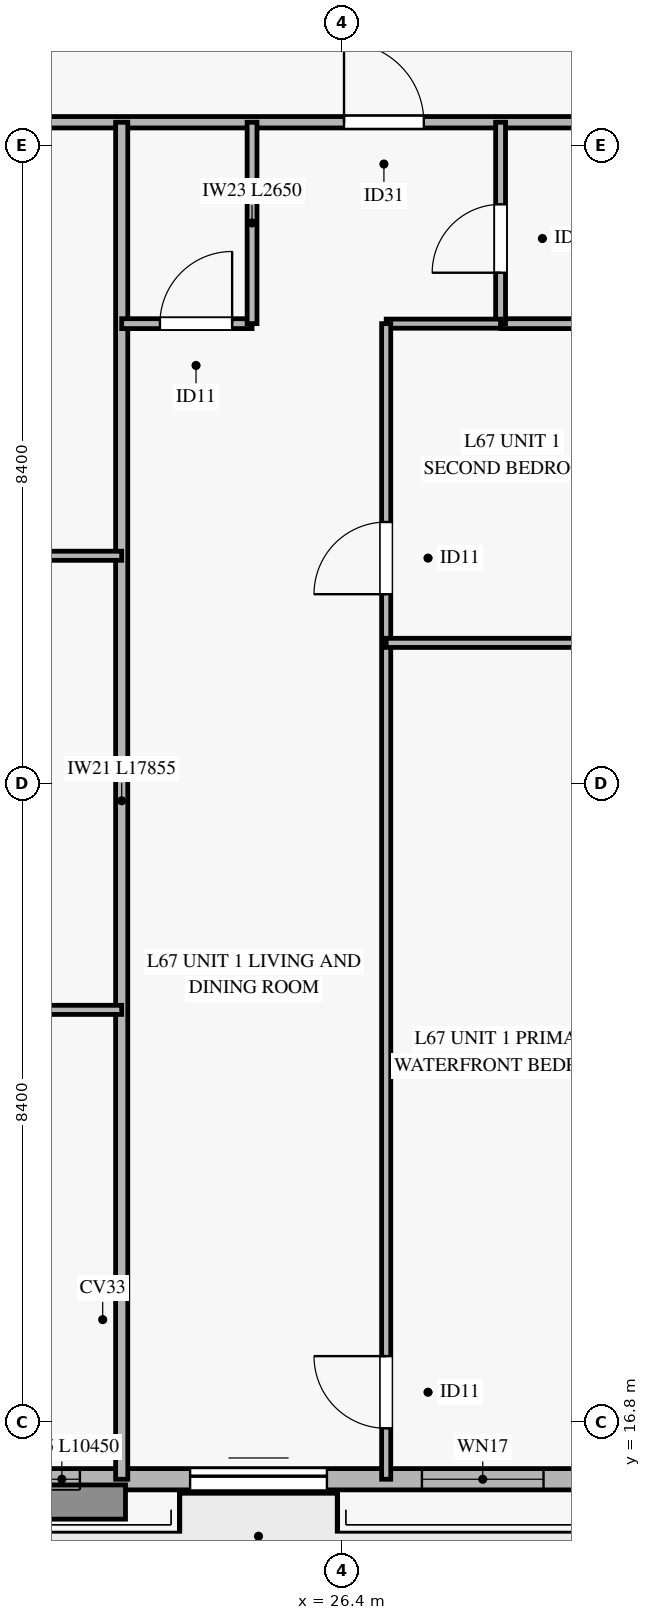
"""IFC4 building model, lengths in metres.
Left out: names, types, materials, properties, quantities, classifications, styles, units other than length and angle.
Written with IfcOpenShell. Run it as: python <this file> out.ifc"""

import sys

from ifc_helpers import new_model, si_unit, direction, frame, frame_2d, origin, place, context, subcontext, project, spatial, rectangle, extrude, source, transform, mapped, element, fill, save


model = new_model("IFC4")
c1 = context("Model", 3, precision=1e-05, world=origin(), true_north=direction((0.0, 1.0)))
c2 = subcontext(c1, "Body", "Model", "MODEL_VIEW")
j1 = project(units=[si_unit("LENGTHUNIT", "METRE"), si_unit("PLANEANGLEUNIT", "RADIAN")], contexts=[c1])
p1 = place(None, origin())
s1 = spatial("IfcSite", under=j1, at=p1, CompositionType="ELEMENT")
p2 = place(p1, origin())
s2 = spatial("IfcBuilding", under=s1, at=p2, CompositionType="ELEMENT")
p3 = place(p2, frame((0.0, 0.0, 262.1)))
s3 = spatial("IfcBuildingStorey", under=s2, at=p3, CompositionType="ELEMENT", Elevation=262.1)
p4 = place(p3, frame((20.1, 16.045, 0.0), z_axis=(0.0, 0.0, 1.0), x_axis=(1.0, 0.0, 0.0)))
e1 = element("IfcWall", 1, at=p4, inside=s3, PredefinedType="SOLIDWALL", context=c2, shape_type="SweptSolid", body=[
    extrude(rectangle(XDim=10.45, YDim=0.28, at=frame_2d((5.225, 0.0))), origin(), (0.0, 0.0, 1.0), 2.815),
])
p5 = place(p4, frame((4.3, 0.0, 0.0)))
e2 = element("IfcOpeningElement", 2, at=p5, cuts=e1, PredefinedType="OPENING", context=c2, shape_type="SweptSolid", body=[
    extrude(rectangle(XDim=1.8, YDim=2.25, at=frame_2d((0.9, 1.125))), frame((0.0, 0.15, 0.0), z_axis=(0.0, -1.0, 0.0), x_axis=(1.0, 0.0, 0.0)), (0.0, 0.0, 1.0), 0.3),
])
p6 = place(p4, frame((0.65, 0.0, 0.45)))
e3 = element("IfcOpeningElement", 3, at=p6, cuts=e1, PredefinedType="OPENING", context=c2, shape_type="SweptSolid", body=[
    extrude(rectangle(XDim=2.2, YDim=2.1, at=frame_2d((1.1, 1.05))), frame((0.0, 0.15, 0.0), z_axis=(0.0, -1.0, 0.0), x_axis=(1.0, 0.0, 0.0)), (0.0, 0.0, 1.0), 0.3),
])
p7 = place(p4, frame((7.35, 0.0, 0.45)))
e4 = element("IfcOpeningElement", 4, at=p7, cuts=e1, PredefinedType="OPENING", context=c2, shape_type="SweptSolid", body=[
    extrude(rectangle(XDim=1.6, YDim=2.0, at=frame_2d((0.8, 1.0))), frame((0.0, 0.15, 0.0), z_axis=(0.0, -1.0, 0.0), x_axis=(1.0, 0.0, 0.0)), (0.0, 0.0, 1.0), 0.3),
])
p8 = place(p3, frame((8.779, 33.9, 0.0), z_axis=(0.0, 0.0, 1.0), x_axis=(1.0, 0.0, 0.0)))
e5 = element("IfcWall", 5, at=p8, inside=s3, PredefinedType="PARTITIONING", context=c2, shape_type="SweptSolid", body=[
    extrude(rectangle(XDim=52.843, YDim=0.15, at=frame_2d((26.421, 0.0))), origin(), (0.0, 0.0, 1.0), 2.47),
])
p9 = place(p8, frame((5.887, 0.0, 0.0)))
e6 = element("IfcOpeningElement", 6, at=p9, cuts=e5, PredefinedType="OPENING", context=c2, shape_type="SweptSolid", body=[
    extrude(rectangle(XDim=1.05, YDim=2.15, at=frame_2d((0.525, 1.075))), frame((0.0, 0.085, 0.0), z_axis=(0.0, -1.0, 0.0), x_axis=(1.0, 0.0, 0.0)), (0.0, 0.0, 1.0), 0.17),
])
p10 = place(p8, frame((17.646, 0.0, 0.0)))
e7 = element("IfcOpeningElement", 7, at=p10, cuts=e5, PredefinedType="OPENING", context=c2, shape_type="SweptSolid", body=[
    extrude(rectangle(XDim=1.05, YDim=2.15, at=frame_2d((0.525, 1.075))), frame((0.0, 0.085, 0.0), z_axis=(0.0, -1.0, 0.0), x_axis=(1.0, 0.0, 0.0)), (0.0, 0.0, 1.0), 0.17),
])
p11 = place(p8, frame((24.174, 0.0, 0.0)))
e8 = element("IfcOpeningElement", 8, at=p11, cuts=e5, PredefinedType="OPENING", context=c2, shape_type="SweptSolid", body=[
    extrude(rectangle(XDim=1.05, YDim=2.15, at=frame_2d((0.525, 1.075))), frame((0.0, 0.085, 0.0), z_axis=(0.0, -1.0, 0.0), x_axis=(1.0, 0.0, 0.0)), (0.0, 0.0, 1.0), 0.17),
])
p12 = place(p8, frame((31.096, 0.0, 0.0)))
e9 = element("IfcOpeningElement", 9, at=p12, cuts=e5, PredefinedType="OPENING", context=c2, shape_type="SweptSolid", body=[
    extrude(rectangle(XDim=1.05, YDim=2.15, at=frame_2d((0.525, 1.075))), frame((0.0, 0.085, 0.0), z_axis=(0.0, -1.0, 0.0), x_axis=(1.0, 0.0, 0.0)), (0.0, 0.0, 1.0), 0.17),
])
p13 = place(p8, frame((37.241, 0.0, 0.0)))
e10 = element("IfcOpeningElement", 10, at=p13, cuts=e5, PredefinedType="OPENING", context=c2, shape_type="SweptSolid", body=[
    extrude(rectangle(XDim=1.05, YDim=2.15, at=frame_2d((0.525, 1.075))), frame((0.0, 0.085, 0.0), z_axis=(0.0, -1.0, 0.0), x_axis=(1.0, 0.0, 0.0)), (0.0, 0.0, 1.0), 0.17),
])
p14 = place(p8, frame((45.359, 0.0, 0.0)))
e11 = element("IfcOpeningElement", 11, at=p14, cuts=e5, PredefinedType="OPENING", context=c2, shape_type="SweptSolid", body=[
    extrude(rectangle(XDim=1.05, YDim=2.15, at=frame_2d((0.525, 1.075))), frame((0.0, 0.085, 0.0), z_axis=(0.0, -1.0, 0.0), x_axis=(1.0, 0.0, 0.0)), (0.0, 0.0, 1.0), 0.17),
])
p15 = place(p3, frame((23.5, 16.045, 0.0), z_axis=(0.0, 0.0, 1.0), x_axis=(0.0, 1.0, 0.0)))
e12 = element("IfcWall", 12, at=p15, inside=s3, PredefinedType="PARTITIONING", context=c2, shape_type="SweptSolid", body=[
    extrude(rectangle(XDim=17.855, YDim=0.16, at=frame_2d((8.927, 0.0))), origin(), (0.0, 0.0, 1.0), 2.77),
])
p16 = place(p3, frame((8.779, 22.221, 0.0), z_axis=(0.0, 0.0, 1.0), x_axis=(1.0, 0.0, 0.0)))
e13 = element("IfcWall", 13, at=p16, inside=s3, PredefinedType="PARTITIONING", context=c2, shape_type="SweptSolid", body=[
    extrude(rectangle(XDim=14.721, YDim=0.12, at=frame_2d((7.36, 0.0))), origin(), (0.0, 0.0, 1.0), 2.47),
])
p17 = place(p16, frame((6.174, 0.0, 0.0)))
e14 = element("IfcOpeningElement", 14, at=p17, cuts=e13, PredefinedType="OPENING", context=c2, shape_type="SweptSolid", body=[
    extrude(rectangle(XDim=0.95, YDim=2.1, at=frame_2d((0.475, 1.05))), frame((0.0, 0.07, 0.0), z_axis=(0.0, -1.0, 0.0), x_axis=(1.0, 0.0, 0.0)), (0.0, 0.0, 1.0), 0.14),
])
p18 = place(p3, frame((8.779, 28.196, 0.0), z_axis=(0.0, 0.0, 1.0), x_axis=(1.0, 0.0, 0.0)))
e15 = element("IfcWall", 15, at=p18, inside=s3, PredefinedType="PARTITIONING", context=c2, shape_type="SweptSolid", body=[
    extrude(rectangle(XDim=14.721, YDim=0.12, at=frame_2d((7.36, 0.0))), origin(), (0.0, 0.0, 1.0), 2.47),
])
p19 = place(p18, frame((6.174, 0.0, 0.0)))
e16 = element("IfcOpeningElement", 16, at=p19, cuts=e15, PredefinedType="OPENING", context=c2, shape_type="SweptSolid", body=[
    extrude(rectangle(XDim=0.95, YDim=2.1, at=frame_2d((0.475, 1.05))), frame((0.0, 0.07, 0.0), z_axis=(0.0, -1.0, 0.0), x_axis=(1.0, 0.0, 0.0)), (0.0, 0.0, 1.0), 0.14),
])
p20 = place(p3, frame((23.5, 31.25, 0.0), z_axis=(0.0, 0.0, 1.0), x_axis=(1.0, 0.0, 0.0)))
e17 = element("IfcWall", 17, at=p20, inside=s3, PredefinedType="PARTITIONING", context=c2, shape_type="SweptSolid", body=[
    extrude(rectangle(XDim=1.715, YDim=0.13, at=frame_2d((0.857, 0.0))), origin(), (0.0, 0.0, 1.0), 3.185),
])
p21 = place(p20, frame((0.503, 0.0, 0.0)))
e18 = element("IfcOpeningElement", 18, at=p21, cuts=e17, PredefinedType="OPENING", context=c2, shape_type="SweptSolid", body=[
    extrude(rectangle(XDim=0.95, YDim=2.1, at=frame_2d((0.475, 1.05))), frame((0.0, 0.075, 0.0), z_axis=(0.0, -1.0, 0.0), x_axis=(1.0, 0.0, 0.0)), (0.0, 0.0, 1.0), 0.15),
])
p22 = place(p3, frame((25.215, 31.25, 0.0), z_axis=(0.0, 0.0, 1.0), x_axis=(0.0, 1.0, 0.0)))
e19 = element("IfcWall", 19, at=p22, inside=s3, PredefinedType="PARTITIONING", context=c2, shape_type="SweptSolid", body=[
    extrude(rectangle(XDim=2.65, YDim=0.13, at=frame_2d((1.325, 0.0))), origin(), (0.0, 0.0, 1.0), 2.77),
])
p23 = place(p3, frame((28.485, 31.25, 0.0), z_axis=(0.0, 0.0, 1.0), x_axis=(1.0, 0.0, 0.0)))
e20 = element("IfcWall", 20, at=p23, inside=s3, PredefinedType="PARTITIONING", context=c2, shape_type="SweptSolid", body=[
    extrude(rectangle(XDim=1.715, YDim=0.13, at=frame_2d((0.857, 0.0))), origin(), (0.0, 0.0, 1.0), 3.185),
])
p24 = place(p3, frame((28.485, 31.25, 0.0), z_axis=(0.0, 0.0, 1.0), x_axis=(0.0, 1.0, 0.0)))
e21 = element("IfcWall", 21, at=p24, inside=s3, PredefinedType="PARTITIONING", context=c2, shape_type="SweptSolid", body=[
    extrude(rectangle(XDim=2.65, YDim=0.13, at=frame_2d((1.325, 0.0))), origin(), (0.0, 0.0, 1.0), 2.77),
])
p25 = place(p24, frame((0.67, 0.0, 0.0)))
e22 = element("IfcOpeningElement", 22, at=p25, cuts=e21, PredefinedType="OPENING", context=c2, shape_type="SweptSolid", body=[
    extrude(rectangle(XDim=0.9, YDim=2.1, at=frame_2d((0.45, 1.05))), frame((0.0, 0.075, 0.0), z_axis=(0.0, -1.0, 0.0), x_axis=(1.0, 0.0, 0.0)), (0.0, 0.0, 1.0), 0.15),
])
p26 = place(p3, frame((26.98, 31.25, 0.0), z_axis=(0.0, 0.0, 1.0), x_axis=(1.0, 0.0, 0.0)))
e23 = element("IfcWall", 23, at=p26, inside=s3, PredefinedType="PARTITIONING", context=c2, shape_type="SweptSolid", body=[
    extrude(rectangle(XDim=1.505, YDim=0.12, at=frame_2d((0.752, 0.0))), origin(), (0.0, 0.0, 1.0), 3.185),
])
p27 = place(p3, frame((26.98, 16.045, 0.0), z_axis=(0.0, 0.0, 1.0), x_axis=(0.0, 1.0, 0.0)))
e24 = element("IfcWall", 24, at=p27, inside=s3, PredefinedType="PARTITIONING", context=c2, shape_type="SweptSolid", body=[
    extrude(rectangle(XDim=15.205, YDim=0.12, at=frame_2d((7.603, 0.0))), origin(), (0.0, 0.0, 1.0), 2.77),
])
p28 = place(p27, frame((0.67, 0.0, 0.0)))
e25 = element("IfcOpeningElement", 25, at=p28, cuts=e24, PredefinedType="OPENING", context=c2, shape_type="SweptSolid", body=[
    extrude(rectangle(XDim=0.95, YDim=2.1, at=frame_2d((0.475, 1.05))), frame((0.0, 0.07, 0.0), z_axis=(0.0, -1.0, 0.0), x_axis=(1.0, 0.0, 0.0)), (0.0, 0.0, 1.0), 0.14),
])
p29 = place(p27, frame((11.645, 0.0, 0.0)))
e26 = element("IfcOpeningElement", 26, at=p29, cuts=e24, PredefinedType="OPENING", context=c2, shape_type="SweptSolid", body=[
    extrude(rectangle(XDim=0.95, YDim=2.1, at=frame_2d((0.475, 1.05))), frame((0.0, 0.07, 0.0), z_axis=(0.0, -1.0, 0.0), x_axis=(1.0, 0.0, 0.0)), (0.0, 0.0, 1.0), 0.14),
])
p30 = place(p3, frame((26.98, 27.05, 0.0), z_axis=(0.0, 0.0, 1.0), x_axis=(1.0, 0.0, 0.0)))
e27 = element("IfcWall", 27, at=p30, inside=s3, PredefinedType="PARTITIONING", context=c2, shape_type="SweptSolid", body=[
    extrude(rectangle(XDim=3.22, YDim=0.12, at=frame_2d((1.61, 0.0))), origin(), (0.0, 0.0, 1.0), 3.185),
])
m1 = source(origin(), c2, "Body", "SweptSolid", [
    extrude(rectangle(XDim=1.8, YDim=2.25, at=frame_2d((0.9, 1.125))), frame((0.0, 0.025, 0.0), z_axis=(0.0, -1.0, 0.0), x_axis=(1.0, 0.0, 0.0)), (0.0, 0.0, 1.0), 0.05),
])
p31 = place(p5, origin())
e28 = element("IfcDoor", 28, at=p31, inside=s3, OperationType="SLIDING_TO_LEFT", PredefinedType="DOOR", context=c2, shape_type="MappedRepresentation", body=[
    mapped(m1, transform((0.0, 0.0, 0.0), x_axis=(1.0, 0.0, 0.0), y_axis=(0.0, 1.0, 0.0), z_axis=(0.0, 0.0, 1.0), scale=1.0)),
])
fill(e2, e28)
m2 = source(origin(), c2, "Body", "SweptSolid", [
    extrude(rectangle(XDim=2.2, YDim=2.1, at=frame_2d((1.1, 1.05))), frame((0.0, 0.03, 0.0), z_axis=(0.0, -1.0, 0.0), x_axis=(1.0, 0.0, 0.0)), (0.0, 0.0, 1.0), 0.06),
])
p32 = place(p6, origin())
e29 = element("IfcWindow", 29, at=p32, inside=s3, PartitioningType="SINGLE_PANEL", PredefinedType="WINDOW", context=c2, shape_type="MappedRepresentation", body=[
    mapped(m2, transform((0.0, 0.0, 0.0), x_axis=(1.0, 0.0, 0.0), y_axis=(0.0, 1.0, 0.0), z_axis=(0.0, 0.0, 1.0), scale=1.0)),
])
fill(e3, e29)
m3 = source(origin(), c2, "Body", "SweptSolid", [
    extrude(rectangle(XDim=1.6, YDim=2.0, at=frame_2d((0.8, 1.0))), frame((0.0, 0.03, 0.0), z_axis=(0.0, -1.0, 0.0), x_axis=(1.0, 0.0, 0.0)), (0.0, 0.0, 1.0), 0.06),
])
p33 = place(p7, origin())
e30 = element("IfcWindow", 30, at=p33, inside=s3, PartitioningType="SINGLE_PANEL", PredefinedType="WINDOW", context=c2, shape_type="MappedRepresentation", body=[
    mapped(m3, transform((0.0, 0.0, 0.0), x_axis=(1.0, 0.0, 0.0), y_axis=(0.0, 1.0, 0.0), z_axis=(0.0, 0.0, 1.0), scale=1.0)),
])
fill(e4, e30)
m4 = source(origin(), c2, "Body", "SweptSolid", [
    extrude(rectangle(XDim=1.05, YDim=2.15, at=frame_2d((0.525, 1.075))), frame((0.0, 0.025, 0.0), z_axis=(0.0, -1.0, 0.0), x_axis=(1.0, 0.0, 0.0)), (0.0, 0.0, 1.0), 0.05),
])
p34 = place(p10, origin())
e31 = element("IfcDoor", 31, at=p34, inside=s3, OperationType="SINGLE_SWING_LEFT", PredefinedType="DOOR", context=c2, shape_type="MappedRepresentation", body=[
    mapped(m4, transform((0.0, 0.0, 0.0), x_axis=(1.0, 0.0, 0.0), y_axis=(0.0, 1.0, 0.0), z_axis=(0.0, 0.0, 1.0), scale=1.0)),
])
fill(e7, e31)
m5 = source(origin(), c2, "Body", "SweptSolid", [
    extrude(rectangle(XDim=0.95, YDim=2.1, at=frame_2d((0.475, 1.05))), frame((0.0, 0.025, 0.0), z_axis=(0.0, -1.0, 0.0), x_axis=(1.0, 0.0, 0.0)), (0.0, 0.0, 1.0), 0.05),
])
p35 = place(p21, origin())
e32 = element("IfcDoor", 32, at=p35, inside=s3, OperationType="SINGLE_SWING_RIGHT", PredefinedType="DOOR", context=c2, shape_type="MappedRepresentation", body=[
    mapped(m5, transform((0.0, 0.0, 0.0), x_axis=(1.0, 0.0, 0.0), y_axis=(0.0, 1.0, 0.0), z_axis=(0.0, 0.0, 1.0), scale=1.0)),
])
fill(e18, e32)
m6 = source(origin(), c2, "Body", "SweptSolid", [
    extrude(rectangle(XDim=0.9, YDim=2.1, at=frame_2d((0.45, 1.05))), frame((0.0, 0.025, 0.0), z_axis=(0.0, -1.0, 0.0), x_axis=(1.0, 0.0, 0.0)), (0.0, 0.0, 1.0), 0.05),
])
p36 = place(p25, origin())
e33 = element("IfcDoor", 33, at=p36, inside=s3, OperationType="SINGLE_SWING_LEFT", PredefinedType="DOOR", context=c2, shape_type="MappedRepresentation", body=[
    mapped(m6, transform((0.0, 0.0, 0.0), x_axis=(1.0, 0.0, 0.0), y_axis=(0.0, 1.0, 0.0), z_axis=(0.0, 0.0, 1.0), scale=1.0)),
])
fill(e22, e33)
p37 = place(p28, origin())
e34 = element("IfcDoor", 34, at=p37, inside=s3, OperationType="SINGLE_SWING_RIGHT", PredefinedType="DOOR", context=c2, shape_type="MappedRepresentation", body=[
    mapped(m5, transform((0.0, 0.0, 0.0), x_axis=(1.0, 0.0, 0.0), y_axis=(0.0, 1.0, 0.0), z_axis=(0.0, 0.0, 1.0), scale=1.0)),
])
fill(e25, e34)
p38 = place(p29, origin())
e35 = element("IfcDoor", 35, at=p38, inside=s3, OperationType="SINGLE_SWING_LEFT", PredefinedType="DOOR", context=c2, shape_type="MappedRepresentation", body=[
    mapped(m5, transform((0.0, 0.0, 0.0), x_axis=(1.0, 0.0, 0.0), y_axis=(0.0, 1.0, 0.0), z_axis=(0.0, 0.0, 1.0), scale=1.0)),
])
fill(e26, e35)
save(model, sys.argv[1])
